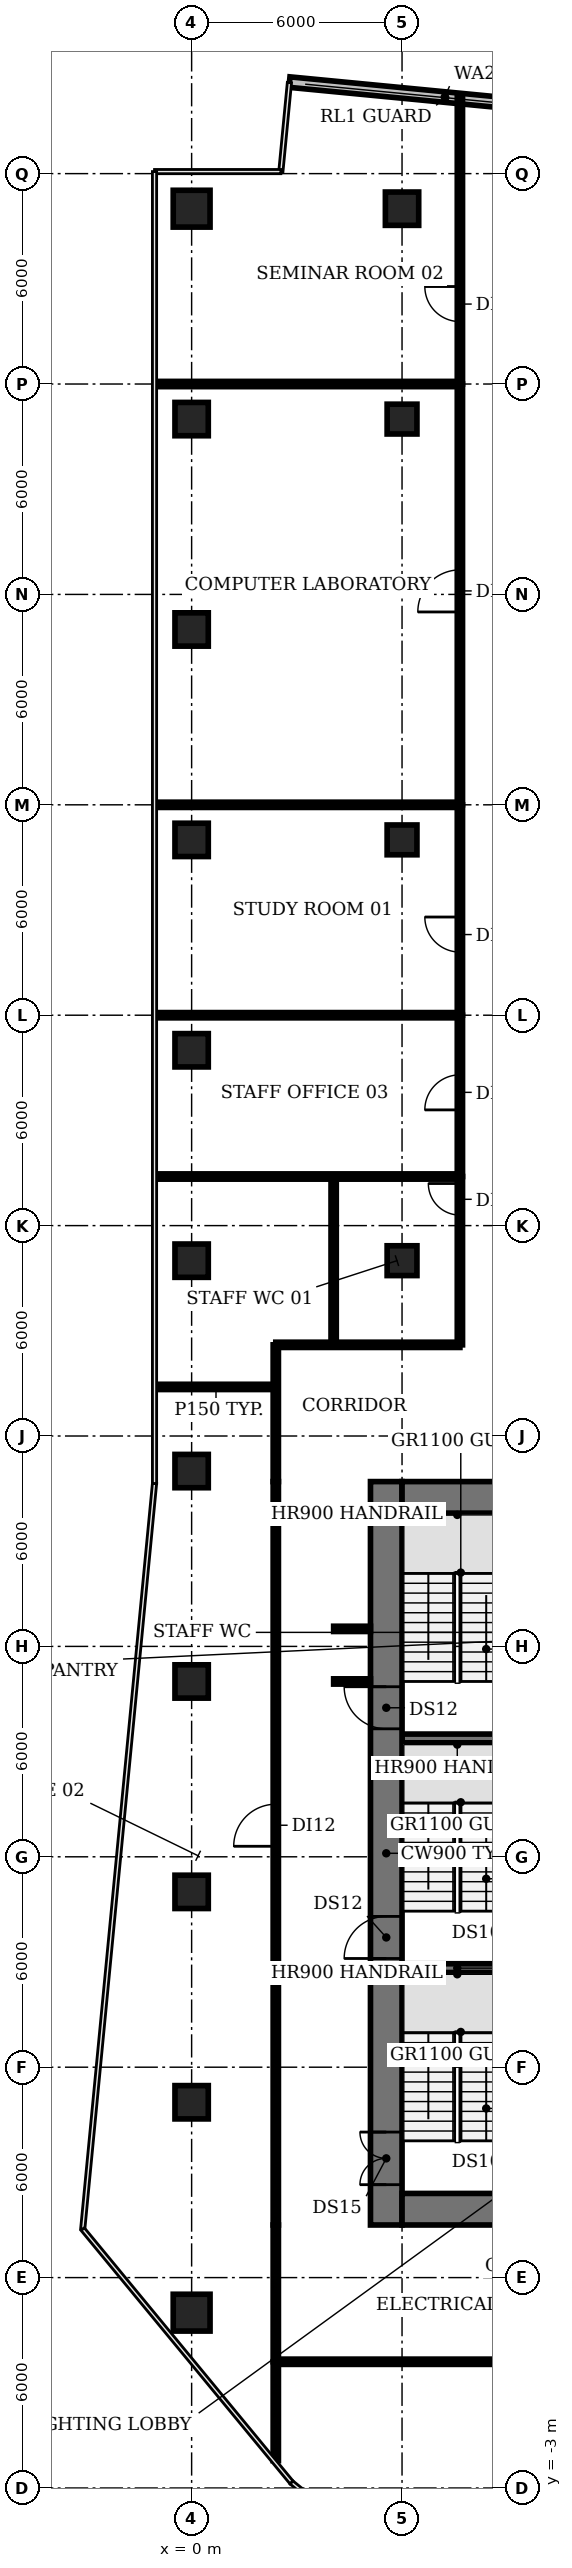
"""IFC4 building model, lengths in metres.
Left out: names, types, materials, properties, quantities, classifications, styles, units other than length and angle.
Written with IfcOpenShell. Run it as: python <this file> out.ifc"""

import sys

from ifc_helpers import new_model, si_unit, direction, frame, frame_2d, origin, origin_2d, place, context, subcontext, project, spatial, rectangle, circle, extrude, element, fill, save


model = new_model("IFC4")
c1 = context("Model", 3, precision=1e-05, world=origin(), true_north=direction((0.0, 1.0)))
c2 = subcontext(c1, "Body", "Model", "MODEL_VIEW")
j1 = project(units=[si_unit("LENGTHUNIT", "METRE"), si_unit("PLANEANGLEUNIT", "RADIAN")], contexts=[c1])
p1 = place(None, origin())
s1 = spatial("IfcSite", under=j1, at=p1, CompositionType="ELEMENT")
p2 = place(p1, origin())
s2 = spatial("IfcBuilding", under=s1, at=p2, CompositionType="ELEMENT")
p3 = place(p2, frame((0.0, 0.0, 29.0)))
s3 = spatial("IfcBuildingStorey", under=s2, at=p3, CompositionType="ELEMENT", Elevation=29.0)
p4 = place(p3, frame((0.0, 2.0, 0.0), z_axis=(0.0, 0.0, 1.0), x_axis=(1.0, 0.0, 0.0)))
e1 = element("IfcColumn", 1, at=p4, inside=s3, PredefinedType="COLUMN", context=c2, shape_type="SweptSolid", body=[
    extrude(circle(Radius=0.525, at=origin_2d()), origin(), (0.0, 0.0, 1.0), 3.85),
])
for number, where, z_axis, x_axis in (
    (2, (0.0, 8.0, 0.0), (0.0, 0.0, 1.0), (1.0, 0.0, 0.0)),
    (3, (0.0, 14.0, 0.0), (0.0, 0.0, 1.0), (1.0, 0.0, 0.0)),
    (4, (0.0, 20.0, 0.0), (0.0, 0.0, 1.0), (1.0, 0.0, 0.0)),
    (5, (0.0, 26.0, 0.0), (0.0, 0.0, 1.0), (1.0, 0.0, 0.0)),
    (6, (0.0, 32.0, 0.0), (0.0, 0.0, 1.0), (1.0, 0.0, 0.0)),
    (7, (0.0, 38.0, 0.0), (0.0, 0.0, 1.0), (1.0, 0.0, 0.0)),
    (8, (0.0, 44.0, 0.0), (0.0, 0.0, 1.0), (1.0, 0.0, 0.0)),
    (9, (0.0, 50.0, 0.0), (0.0, 0.0, 1.0), (1.0, 0.0, 0.0)),
    (10, (0.0, 56.0, 0.0), (0.0, 0.0, 1.0), (1.0, 0.0, 0.0)),
):
    element("IfcColumn", number, at=place(p3, frame(where, z_axis=z_axis, x_axis=x_axis)), inside=s3, PredefinedType="COLUMN", context=c2, shape_type="SweptSolid", body=[
        extrude(rectangle(XDim=0.95, YDim=0.95, at=origin_2d()), origin(), (0.0, 0.0, 1.0), 3.85),
    ])
p5 = place(p3, frame((0.0, 62.0, 0.0), z_axis=(0.0, 0.0, 1.0), x_axis=(1.0, 0.0, 0.0)))
e11 = element("IfcColumn", 11, at=p5, inside=s3, PredefinedType="COLUMN", context=c2, shape_type="SweptSolid", body=[
    extrude(circle(Radius=0.525, at=origin_2d()), origin(), (0.0, 0.0, 1.0), 3.85),
])
for number, where, z_axis, x_axis in (
    (12, (6.0, 32.0, 0.0), (0.0, 0.0, 1.0), (1.0, 0.0, 0.0)),
    (13, (6.0, 44.0, 0.0), (0.0, 0.0, 1.0), (1.0, 0.0, 0.0)),
    (14, (6.0, 56.0, 0.0), (0.0, 0.0, 1.0), (1.0, 0.0, 0.0)),
):
    element("IfcColumn", number, at=place(p3, frame(where, z_axis=z_axis, x_axis=x_axis)), inside=s3, PredefinedType="COLUMN", context=c2, shape_type="SweptSolid", body=[
        extrude(rectangle(XDim=0.85, YDim=0.85, at=origin_2d()), origin(), (0.0, 0.0, 1.0), 3.85),
    ])
p6 = place(p3, frame((6.0, 62.0, 0.0), z_axis=(0.0, 0.0, 1.0), x_axis=(1.0, 0.0, 0.0)))
e15 = element("IfcColumn", 15, at=p6, inside=s3, PredefinedType="COLUMN", context=c2, shape_type="SweptSolid", body=[
    extrude(rectangle(XDim=0.95, YDim=0.95, at=origin_2d()), origin(), (0.0, 0.0, 1.0), 3.85),
])
p7 = place(p3, frame((11.643, 64.758, 0.0), z_axis=(0.0, 0.0, 1.0), x_axis=(-0.995397352985, 0.095833760598, 0.0)))
e16 = element("IfcWall", 16, at=p7, inside=s3, PredefinedType="SOLIDWALL", context=c2, shape_type="SweptSolid", body=[
    extrude(rectangle(XDim=8.894, YDim=0.3, at=frame_2d((4.447, 0.0))), origin(), (0.0, 0.0, 1.0), 3.85),
])
for number, where, z_axis, x_axis in (
    (17, (6.0, 11.825, 0.0), (0.0, 0.0, 1.0), (1.0, 0.0, 0.0)),
    (18, (6.0, 18.375, 0.0), (0.0, 0.0, 1.0), (1.0, 0.0, 0.0)),
):
    element("IfcWall", number, at=place(p3, frame(where, z_axis=z_axis, x_axis=x_axis)), inside=s3, PredefinedType="SHEAR", context=c2, shape_type="SweptSolid", body=[
        extrude(rectangle(XDim=3.15, YDim=0.25, at=frame_2d((1.575, 0.0))), origin(), (0.0, 0.0, 1.0), 3.85),
    ])
p8 = place(p3, frame((5.55, 4.5, 0.0), z_axis=(0.0, 0.0, 1.0), x_axis=(0.0, 1.0, 0.0)))
e19 = element("IfcWall", 19, at=p8, inside=s3, PredefinedType="SHEAR", context=c2, shape_type="SweptSolid", body=[
    extrude(rectangle(XDim=21.2, YDim=0.9, at=frame_2d((10.6, 0.0))), origin(), (0.0, 0.0, 1.0), 3.85),
])
p9 = place(p8, frame((1.15, 0.0, 0.0)))
e20 = element("IfcOpeningElement", 20, at=p9, cuts=e19, PredefinedType="OPENING", context=c2, shape_type="SweptSolid", body=[
    extrude(rectangle(XDim=1.5, YDim=2.1, at=frame_2d((0.75, 1.05))), frame((0.0, 0.46, 0.0), z_axis=(0.0, -1.0, 0.0), x_axis=(1.0, 0.0, 0.0)), (0.0, 0.0, 1.0), 0.92),
])
p10 = place(p8, frame((7.6, 0.0, 0.0)))
e21 = element("IfcOpeningElement", 21, at=p10, cuts=e19, PredefinedType="OPENING", context=c2, shape_type="SweptSolid", body=[
    extrude(rectangle(XDim=1.2, YDim=2.1, at=frame_2d((0.6, 1.05))), frame((0.0, 0.46, 0.0), z_axis=(0.0, -1.0, 0.0), x_axis=(1.0, 0.0, 0.0)), (0.0, 0.0, 1.0), 0.92),
])
p11 = place(p8, frame((14.15, 0.0, 0.0)))
e22 = element("IfcOpeningElement", 22, at=p11, cuts=e19, PredefinedType="OPENING", context=c2, shape_type="SweptSolid", body=[
    extrude(rectangle(XDim=1.2, YDim=2.1, at=frame_2d((0.6, 1.05))), frame((0.0, 0.46, 0.0), z_axis=(0.0, -1.0, 0.0), x_axis=(1.0, 0.0, 0.0)), (0.0, 0.0, 1.0), 0.92),
])
p12 = place(p3, frame((24.0, 4.95, 0.0), z_axis=(0.0, 0.0, 1.0), x_axis=(-1.0, 0.0, 0.0)))
e23 = element("IfcWall", 23, at=p12, inside=s3, PredefinedType="SHEAR", context=c2, shape_type="SweptSolid", body=[
    extrude(rectangle(XDim=18.0, YDim=0.9, at=frame_2d((9.0, 0.0))), origin(), (0.0, 0.0, 1.0), 3.85),
])
p13 = place(p12, frame((13.0, 0.0, 0.0)))
e24 = element("IfcOpeningElement", 24, at=p13, cuts=e23, PredefinedType="OPENING", context=c2, shape_type="SweptSolid", body=[
    extrude(rectangle(XDim=1.2, YDim=2.1, at=frame_2d((0.6, 1.05))), frame((0.0, 0.46, 0.0), z_axis=(0.0, -1.0, 0.0), x_axis=(1.0, 0.0, 0.0)), (0.0, 0.0, 1.0), 0.92),
])
p14 = place(p12, frame((4.9, 0.0, 0.0)))
e25 = element("IfcOpeningElement", 25, at=p14, cuts=e23, PredefinedType="OPENING", context=c2, shape_type="SweptSolid", body=[
    extrude(rectangle(XDim=1.0, YDim=2.1, at=frame_2d((0.5, 1.05))), frame((0.0, 0.46, 0.0), z_axis=(0.0, -1.0, 0.0), x_axis=(1.0, 0.0, 0.0)), (0.0, 0.0, 1.0), 0.92),
])
p15 = place(p3, frame((6.0, 25.25, 0.0), z_axis=(0.0, 0.0, 1.0), x_axis=(1.0, 0.0, 0.0)))
e26 = element("IfcWall", 26, at=p15, inside=s3, PredefinedType="SHEAR", context=c2, shape_type="SweptSolid", body=[
    extrude(rectangle(XDim=18.0, YDim=0.9, at=frame_2d((9.0, 0.0))), origin(), (0.0, 0.0, 1.0), 3.85),
])
p16 = place(p3, frame((-1.01, 28.4, 0.0), z_axis=(0.0, 0.0, 1.0), x_axis=(1.0, 0.0, 0.0)))
e27 = element("IfcWall", 27, at=p16, inside=s3, PredefinedType="PARTITIONING", context=c2, shape_type="SweptSolid", body=[
    extrude(rectangle(XDim=3.41, YDim=0.15, at=frame_2d((1.705, 0.0))), origin(), (0.0, 0.0, 1.0), 2.83),
])
for number, where, z_axis, x_axis in (
    (28, (-1.01, 34.4, 0.0), (0.0, 0.0, 1.0), (1.0, 0.0, 0.0)),
    (29, (-1.01, 39.0, 0.0), (0.0, 0.0, 1.0), (1.0, 0.0, 0.0)),
    (30, (-1.01, 45.0, 0.0), (0.0, 0.0, 1.0), (1.0, 0.0, 0.0)),
    (31, (-1.01, 57.0, 0.0), (0.0, 0.0, 1.0), (1.0, 0.0, 0.0)),
):
    element("IfcWall", number, at=place(p3, frame(where, z_axis=z_axis, x_axis=x_axis)), inside=s3, PredefinedType="PARTITIONING", context=c2, shape_type="SweptSolid", body=[
        extrude(rectangle(XDim=8.66, YDim=0.15, at=frame_2d((4.33, 0.0))), origin(), (0.0, 0.0, 1.0), 2.83),
    ])
p17 = place(p3, frame((2.4, -2.22, 0.0), z_axis=(0.0, 0.0, 1.0), x_axis=(0.0, 1.0, 0.0)))
e32 = element("IfcWall", 32, at=p17, inside=s3, PredefinedType="PARTITIONING", context=c2, shape_type="SweptSolid", body=[
    extrude(rectangle(XDim=2.82, YDim=0.15, at=frame_2d((1.41, 0.0))), origin(), (0.0, 0.0, 1.0), 2.83),
])
p18 = place(p3, frame((2.4, 0.6, 0.0), z_axis=(0.0, 0.0, 1.0), x_axis=(0.0, 1.0, 0.0)))
e33 = element("IfcWall", 33, at=p18, inside=s3, PredefinedType="PARTITIONING", context=c2, shape_type="SweptSolid", body=[
    extrude(rectangle(XDim=3.9, YDim=0.15, at=frame_2d((1.95, 0.0))), origin(), (0.0, 0.0, 1.0), 2.83),
])
p19 = place(p3, frame((2.4, 4.5, 0.0), z_axis=(0.0, 0.0, 1.0), x_axis=(0.0, 1.0, 0.0)))
e34 = element("IfcWall", 34, at=p19, inside=s3, PredefinedType="PARTITIONING", context=c2, shape_type="SweptSolid", body=[
    extrude(rectangle(XDim=21.2, YDim=0.15, at=frame_2d((10.6, 0.0))), origin(), (0.0, 0.0, 1.0), 2.83),
])
p20 = place(p19, frame((10.8, 0.0, 0.0)))
e35 = element("IfcOpeningElement", 35, at=p20, cuts=e34, PredefinedType="OPENING", context=c2, shape_type="SweptSolid", body=[
    extrude(rectangle(XDim=1.2, YDim=2.1, at=frame_2d((0.6, 1.05))), frame((0.0, 0.085, 0.0), z_axis=(0.0, -1.0, 0.0), x_axis=(1.0, 0.0, 0.0)), (0.0, 0.0, 1.0), 0.17),
])
p21 = place(p3, frame((2.4, 25.7, 0.0), z_axis=(0.0, 0.0, 1.0), x_axis=(0.0, 1.0, 0.0)))
e36 = element("IfcWall", 36, at=p21, inside=s3, PredefinedType="PARTITIONING", context=c2, shape_type="SweptSolid", body=[
    extrude(rectangle(XDim=3.9, YDim=0.15, at=frame_2d((1.95, 0.0))), origin(), (0.0, 0.0, 1.0), 2.83),
])
p22 = place(p3, frame((2.4, 29.6, 0.0), z_axis=(0.0, 0.0, 1.0), x_axis=(1.0, 0.0, 0.0)))
e37 = element("IfcWall", 37, at=p22, inside=s3, PredefinedType="PARTITIONING", context=c2, shape_type="SweptSolid", body=[
    extrude(rectangle(XDim=5.25, YDim=0.15, at=frame_2d((2.625, 0.0))), origin(), (0.0, 0.0, 1.0), 2.83),
])
for number, where, z_axis, x_axis in (
    (38, (4.05, 20.0, 0.0), (0.0, 0.0, 1.0), (1.0, 0.0, 0.0)),
    (39, (4.05, 21.5, 0.0), (0.0, 0.0, 1.0), (1.0, 0.0, 0.0)),
):
    element("IfcWall", number, at=place(p3, frame(where, z_axis=z_axis, x_axis=x_axis)), inside=s3, PredefinedType="PARTITIONING", context=c2, shape_type="SweptSolid", body=[
        extrude(rectangle(XDim=1.05, YDim=0.15, at=frame_2d((0.525, 0.0))), origin(), (0.0, 0.0, 1.0), 2.83),
    ])
p23 = place(p3, frame((4.05, 29.6, 0.0), z_axis=(0.0, 0.0, 1.0), x_axis=(0.0, 1.0, 0.0)))
e40 = element("IfcWall", 40, at=p23, inside=s3, PredefinedType="PARTITIONING", context=c2, shape_type="SweptSolid", body=[
    extrude(rectangle(XDim=4.8, YDim=0.15, at=frame_2d((2.4, 0.0))), origin(), (0.0, 0.0, 1.0), 2.83),
])
p24 = place(p3, frame((7.65, 29.6, 0.0), z_axis=(0.0, 0.0, 1.0), x_axis=(0.0, 1.0, 0.0)))
e41 = element("IfcWall", 41, at=p24, inside=s3, PredefinedType="PARTITIONING", context=c2, shape_type="SweptSolid", body=[
    extrude(rectangle(XDim=4.8, YDim=0.15, at=frame_2d((2.4, 0.0))), origin(), (0.0, 0.0, 1.0), 2.83),
])
p25 = place(p24, frame((3.7, 0.0, 0.0)))
e42 = element("IfcOpeningElement", 42, at=p25, cuts=e41, PredefinedType="OPENING", context=c2, shape_type="SweptSolid", body=[
    extrude(rectangle(XDim=0.9, YDim=2.1, at=frame_2d((0.45, 1.05))), frame((0.0, 0.085, 0.0), z_axis=(0.0, -1.0, 0.0), x_axis=(1.0, 0.0, 0.0)), (0.0, 0.0, 1.0), 0.17),
])
p26 = place(p3, frame((7.65, 34.4, 0.0), z_axis=(0.0, 0.0, 1.0), x_axis=(0.0, 1.0, 0.0)))
e43 = element("IfcWall", 43, at=p26, inside=s3, PredefinedType="PARTITIONING", context=c2, shape_type="SweptSolid", body=[
    extrude(rectangle(XDim=4.6, YDim=0.15, at=frame_2d((2.3, 0.0))), origin(), (0.0, 0.0, 1.0), 2.83),
])
p27 = place(p26, frame((1.9, 0.0, 0.0)))
e44 = element("IfcOpeningElement", 44, at=p27, cuts=e43, PredefinedType="OPENING", context=c2, shape_type="SweptSolid", body=[
    extrude(rectangle(XDim=1.0, YDim=2.1, at=frame_2d((0.5, 1.05))), frame((0.0, 0.085, 0.0), z_axis=(0.0, -1.0, 0.0), x_axis=(1.0, 0.0, 0.0)), (0.0, 0.0, 1.0), 0.17),
])
p28 = place(p3, frame((7.65, 39.0, 0.0), z_axis=(0.0, 0.0, 1.0), x_axis=(0.0, 1.0, 0.0)))
e45 = element("IfcWall", 45, at=p28, inside=s3, PredefinedType="PARTITIONING", context=c2, shape_type="SweptSolid", body=[
    extrude(rectangle(XDim=6.0, YDim=0.15, at=frame_2d((3.0, 0.0))), origin(), (0.0, 0.0, 1.0), 2.83),
])
p29 = place(p28, frame((1.8, 0.0, 0.0)))
e46 = element("IfcOpeningElement", 46, at=p29, cuts=e45, PredefinedType="OPENING", context=c2, shape_type="SweptSolid", body=[
    extrude(rectangle(XDim=1.0, YDim=2.1, at=frame_2d((0.5, 1.05))), frame((0.0, 0.085, 0.0), z_axis=(0.0, -1.0, 0.0), x_axis=(1.0, 0.0, 0.0)), (0.0, 0.0, 1.0), 0.17),
])
p30 = place(p3, frame((7.65, 45.0, 0.0), z_axis=(0.0, 0.0, 1.0), x_axis=(0.0, 1.0, 0.0)))
e47 = element("IfcWall", 47, at=p30, inside=s3, PredefinedType="PARTITIONING", context=c2, shape_type="SweptSolid", body=[
    extrude(rectangle(XDim=12.0, YDim=0.15, at=frame_2d((6.0, 0.0))), origin(), (0.0, 0.0, 1.0), 2.83),
])
p31 = place(p30, frame((5.5, 0.0, 0.0)))
e48 = element("IfcOpeningElement", 48, at=p31, cuts=e47, PredefinedType="OPENING", context=c2, shape_type="SweptSolid", body=[
    extrude(rectangle(XDim=1.2, YDim=2.1, at=frame_2d((0.6, 1.05))), frame((0.0, 0.085, 0.0), z_axis=(0.0, -1.0, 0.0), x_axis=(1.0, 0.0, 0.0)), (0.0, 0.0, 1.0), 0.17),
])
p32 = place(p3, frame((7.65, 57.0, 0.0), z_axis=(0.0, 0.0, 1.0), x_axis=(0.0, 1.0, 0.0)))
e49 = element("IfcWall", 49, at=p32, inside=s3, PredefinedType="PARTITIONING", context=c2, shape_type="SweptSolid", body=[
    extrude(rectangle(XDim=8.187, YDim=0.15, at=frame_2d((4.093, 0.0))), origin(), (0.0, 0.0, 1.0), 2.83),
])
p33 = place(p32, frame((1.78, 0.0, 0.0)))
e50 = element("IfcOpeningElement", 50, at=p33, cuts=e49, PredefinedType="OPENING", context=c2, shape_type="SweptSolid", body=[
    extrude(rectangle(XDim=1.0, YDim=2.1, at=frame_2d((0.5, 1.05))), frame((0.0, 0.085, 0.0), z_axis=(0.0, -1.0, 0.0), x_axis=(1.0, 0.0, 0.0)), (0.0, 0.0, 1.0), 0.17),
])
p34 = place(p3, frame((27.6, 0.6, 0.0), z_axis=(0.0, 0.0, 1.0), x_axis=(-1.0, 0.0, 0.0)))
e51 = element("IfcWall", 51, at=p34, inside=s3, PredefinedType="PARTITIONING", context=c2, shape_type="SweptSolid", body=[
    extrude(rectangle(XDim=25.2, YDim=0.15, at=frame_2d((12.6, 0.0))), origin(), (0.0, 0.0, 1.0), 2.83),
])
p35 = place(p34, frame((12.1, 0.0, 0.0)))
e52 = element("IfcOpeningElement", 52, at=p35, cuts=e51, PredefinedType="OPENING", context=c2, shape_type="SweptSolid", body=[
    extrude(rectangle(XDim=1.2, YDim=2.1, at=frame_2d((0.6, 1.05))), frame((0.0, 0.085, 0.0), z_axis=(0.0, -1.0, 0.0), x_axis=(1.0, 0.0, 0.0)), (0.0, 0.0, 1.0), 0.17),
])
p36 = place(p9, origin())
e53 = element("IfcDoor", 53, at=p36, inside=s3, OperationType="DOUBLE_DOOR_SINGLE_SWING", PredefinedType="DOOR", context=c2, shape_type="SweptSolid", body=[
    extrude(rectangle(XDim=1.5, YDim=2.1, at=frame_2d((0.75, 1.05))), frame((0.0, 0.025, 0.0), z_axis=(0.0, -1.0, 0.0), x_axis=(1.0, 0.0, 0.0)), (0.0, 0.0, 1.0), 0.05),
])
fill(e20, e53)
p37 = place(p10, origin())
e54 = element("IfcDoor", 54, at=p37, inside=s3, OperationType="SINGLE_SWING_LEFT", PredefinedType="DOOR", context=c2, shape_type="SweptSolid", body=[
    extrude(rectangle(XDim=1.2, YDim=2.1, at=frame_2d((0.6, 1.05))), frame((0.0, 0.025, 0.0), z_axis=(0.0, -1.0, 0.0), x_axis=(1.0, 0.0, 0.0)), (0.0, 0.0, 1.0), 0.05),
])
fill(e21, e54)
p38 = place(p11, origin())
e55 = element("IfcDoor", 55, at=p38, inside=s3, OperationType="SINGLE_SWING_RIGHT", PredefinedType="DOOR", context=c2, shape_type="SweptSolid", body=[
    extrude(rectangle(XDim=1.2, YDim=2.1, at=frame_2d((0.6, 1.05))), frame((0.0, 0.025, 0.0), z_axis=(0.0, -1.0, 0.0), x_axis=(1.0, 0.0, 0.0)), (0.0, 0.0, 1.0), 0.05),
])
fill(e22, e55)
p39 = place(p20, origin())
e56 = element("IfcDoor", 56, at=p39, inside=s3, OperationType="SINGLE_SWING_LEFT", PredefinedType="DOOR", context=c2, shape_type="SweptSolid", body=[
    extrude(rectangle(XDim=1.2, YDim=2.1, at=frame_2d((0.6, 1.05))), frame((0.0, 0.025, 0.0), z_axis=(0.0, -1.0, 0.0), x_axis=(1.0, 0.0, 0.0)), (0.0, 0.0, 1.0), 0.05),
])
fill(e35, e56)
p40 = place(p25, origin())
e57 = element("IfcDoor", 57, at=p40, inside=s3, OperationType="SINGLE_SWING_RIGHT", PredefinedType="DOOR", context=c2, shape_type="SweptSolid", body=[
    extrude(rectangle(XDim=0.9, YDim=2.1, at=frame_2d((0.45, 1.05))), frame((0.0, 0.025, 0.0), z_axis=(0.0, -1.0, 0.0), x_axis=(1.0, 0.0, 0.0)), (0.0, 0.0, 1.0), 0.05),
])
fill(e42, e57)
p41 = place(p27, origin())
e58 = element("IfcDoor", 58, at=p41, inside=s3, OperationType="SINGLE_SWING_LEFT", PredefinedType="DOOR", context=c2, shape_type="SweptSolid", body=[
    extrude(rectangle(XDim=1.0, YDim=2.1, at=frame_2d((0.5, 1.05))), frame((0.0, 0.025, 0.0), z_axis=(0.0, -1.0, 0.0), x_axis=(1.0, 0.0, 0.0)), (0.0, 0.0, 1.0), 0.05),
])
fill(e44, e58)
p42 = place(p29, origin())
e59 = element("IfcDoor", 59, at=p42, inside=s3, OperationType="SINGLE_SWING_RIGHT", PredefinedType="DOOR", context=c2, shape_type="SweptSolid", body=[
    extrude(rectangle(XDim=1.0, YDim=2.1, at=frame_2d((0.5, 1.05))), frame((0.0, 0.025, 0.0), z_axis=(0.0, -1.0, 0.0), x_axis=(1.0, 0.0, 0.0)), (0.0, 0.0, 1.0), 0.05),
])
fill(e46, e59)
p43 = place(p31, origin())
e60 = element("IfcDoor", 60, at=p43, inside=s3, OperationType="SINGLE_SWING_LEFT", PredefinedType="DOOR", context=c2, shape_type="SweptSolid", body=[
    extrude(rectangle(XDim=1.2, YDim=2.1, at=frame_2d((0.6, 1.05))), frame((0.0, 0.025, 0.0), z_axis=(0.0, -1.0, 0.0), x_axis=(1.0, 0.0, 0.0)), (0.0, 0.0, 1.0), 0.05),
])
fill(e48, e60)
p44 = place(p33, origin())
e61 = element("IfcDoor", 61, at=p44, inside=s3, OperationType="SINGLE_SWING_RIGHT", PredefinedType="DOOR", context=c2, shape_type="SweptSolid", body=[
    extrude(rectangle(XDim=1.0, YDim=2.1, at=frame_2d((0.5, 1.05))), frame((0.0, 0.025, 0.0), z_axis=(0.0, -1.0, 0.0), x_axis=(1.0, 0.0, 0.0)), (0.0, 0.0, 1.0), 0.05),
])
fill(e50, e61)
save(model, sys.argv[1])
